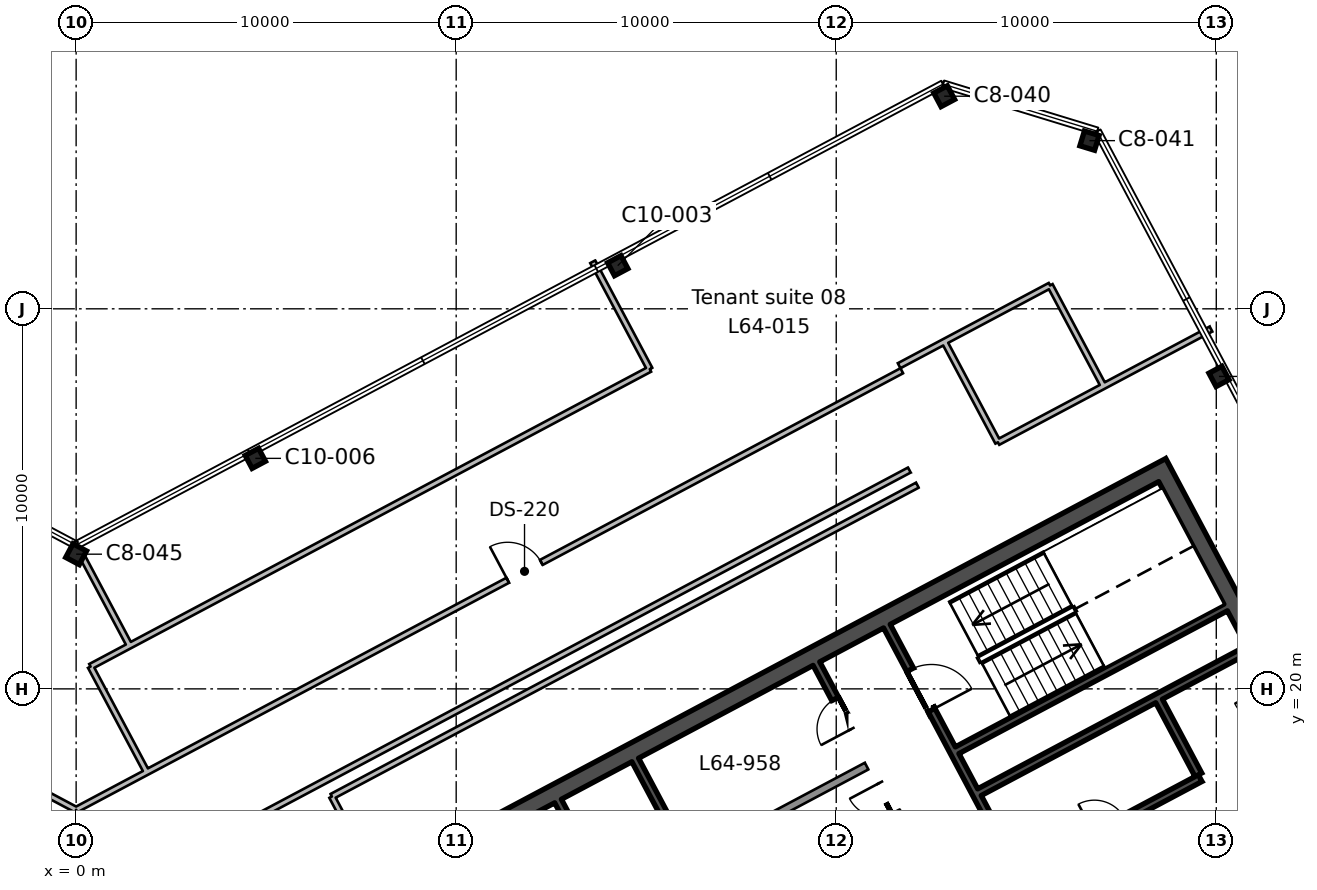
"""IFC4 building model, lengths in metres.
Left out: names, types, materials, properties, quantities, classifications, styles, units other than length and angle.
Written with IfcOpenShell. Run it as: python <this file> out.ifc"""

import sys

from ifc_helpers import new_model, si_unit, direction, frame, frame_2d, origin, origin_2d, place, context, subcontext, project, spatial, rectangle, i_section, extrude, element, fill, save


model = new_model("IFC4")
c1 = context("Model", 3, precision=1e-05, world=origin(), true_north=direction((0.0, 1.0)))
c2 = subcontext(c1, "Body", "Model", "MODEL_VIEW")
j1 = project(units=[si_unit("LENGTHUNIT", "METRE"), si_unit("PLANEANGLEUNIT", "RADIAN")], contexts=[c1])
p1 = place(None, origin())
s1 = spatial("IfcSite", under=j1, at=p1, CompositionType="ELEMENT")
p2 = place(p1, origin())
s2 = spatial("IfcBuilding", under=s1, at=p2, CompositionType="ELEMENT")
p3 = place(p2, frame((0.0, 0.0, 285.3)))
s3 = spatial("IfcBuildingStorey", under=s2, at=p3, CompositionType="ELEMENT", Elevation=285.3)
p4 = place(p3, frame((0.0, 23.544, 0.0), z_axis=(0.0, 0.0, 1.0), x_axis=(-0.882947592859, 0.469471562786, 0.0)))
e1 = element("IfcColumn", 1, at=p4, inside=s3, PredefinedType="COLUMN", context=c2, shape_type="SweptSolid", body=[
    extrude(i_section(OverallWidth=0.404, OverallDepth=0.406, WebThickness=0.027, FlangeThickness=0.044, FilletRadius=0.015, at=origin_2d()), origin(), (0.0, 0.0, 1.0), 3.9),
])
for number, where, z_axis, x_axis in (
    (2, (4.715, 26.065, 0.0), (0.0, 0.0, 1.0), (-0.883, -0.469, 0.0)),
    (3, (30.071, 28.221, 0.0), (0.0, 0.0, 1.0), (-0.469, 0.883, 0.0)),
    (4, (14.251, 31.135, 0.0), (0.0, 0.0, 1.0), (-0.883, -0.469, 0.0)),
):
    element("IfcColumn", number, at=place(p3, frame(where, z_axis=z_axis, x_axis=x_axis)), inside=s3, PredefinedType="COLUMN", context=c2, shape_type="SweptSolid", body=[
        extrude(i_section(OverallWidth=0.399, OverallDepth=0.386, WebThickness=0.021, FlangeThickness=0.033, FilletRadius=0.015, at=origin_2d()), origin(), (0.0, 0.0, 1.0), 3.9),
    ])
for number, where, z_axis, x_axis in (
    (5, (26.664, 34.425, 0.0), (0.0, 0.0, 1.0), (-0.956, 0.292, 0.0)),
    (6, (22.841, 35.594, 0.0), (0.0, 0.0, 1.0), (-0.883, -0.469, 0.0)),
):
    element("IfcColumn", number, at=place(p3, frame(where, z_axis=z_axis, x_axis=x_axis)), inside=s3, PredefinedType="COLUMN", context=c2, shape_type="SweptSolid", body=[
        extrude(i_section(OverallWidth=0.404, OverallDepth=0.406, WebThickness=0.027, FlangeThickness=0.044, FilletRadius=0.015, at=origin_2d()), origin(), (0.0, 0.0, 1.0), 3.9),
    ])
p5 = place(p3, frame((37.439, 9.091, 0.0), z_axis=(0.0, 0.0, 1.0), x_axis=(-0.469467968382, 0.882949504028, 0.0)))
e7 = element("IfcWall", 7, at=p5, inside=s3, PredefinedType="SHEAR", context=c2, shape_type="SweptSolid", body=[
    extrude(rectangle(XDim=19.1, YDim=0.45, at=frame_2d((9.55, 0.0))), origin(), (0.0, 0.0, 1.0), 3.9),
])
p6 = place(p5, frame((10.15, 0.0, 0.0)))
e8 = element("IfcOpeningElement", 8, at=p6, cuts=e7, PredefinedType="OPENING", context=c2, shape_type="SweptSolid", body=[
    extrude(rectangle(XDim=2.4, YDim=2.4, at=frame_2d((1.2, 1.2))), frame((0.0, 0.235, 0.0), z_axis=(0.0, -1.0, 0.0), x_axis=(1.0, 0.0, 0.0)), (0.0, 0.0, 1.0), 0.47),
])
p7 = place(p3, frame((10.544, 16.167, 0.0), z_axis=(0.0, 0.0, 1.0), x_axis=(0.882947755831, 0.46947125628, 0.0)))
e9 = element("IfcWall", 9, at=p7, inside=s3, PredefinedType="SHEAR", context=c2, shape_type="SweptSolid", body=[
    extrude(rectangle(XDim=20.2, YDim=0.45, at=frame_2d((10.1, 0.0))), origin(), (0.0, 0.0, 1.0), 3.9),
])
p8 = place(p3, frame((14.394, 13.826, 0.0), z_axis=(0.0, 0.0, 1.0), x_axis=(-0.469494272526, 0.882935517501, 0.0)))
e10 = element("IfcWall", 10, at=p8, inside=s3, PredefinedType="SHEAR", context=c2, shape_type="SweptSolid", body=[
    extrude(rectangle(XDim=3.65, YDim=0.2, at=frame_2d((1.825, 0.0))), origin(), (0.0, 0.0, 1.0), 3.9),
])
p9 = place(p3, frame((18.138, 11.683, 0.0), z_axis=(0.0, 0.0, 1.0), x_axis=(-0.469480409012, 0.88294288918, 0.0)))
e11 = element("IfcWall", 11, at=p9, inside=s3, PredefinedType="SHEAR", context=c2, shape_type="SweptSolid", body=[
    extrude(rectangle(XDim=7.3, YDim=0.2, at=frame_2d((3.65, 0.0))), origin(), (0.0, 0.0, 1.0), 3.9),
])
p10 = place(p3, frame((22.906, 14.218, 0.0), z_axis=(0.0, 0.0, 1.0), x_axis=(-0.469480409012, 0.88294288918, 0.0)))
e12 = element("IfcWall", 12, at=p10, inside=s3, PredefinedType="SHEAR", context=c2, shape_type="SweptSolid", body=[
    extrude(rectangle(XDim=7.3, YDim=0.2, at=frame_2d((3.65, 0.0))), origin(), (0.0, 0.0, 1.0), 3.9),
])
p11 = place(p10, frame((2.85, 0.0, 0.0)))
e13 = element("IfcOpeningElement", 13, at=p11, cuts=e12, PredefinedType="OPENING", context=c2, shape_type="SweptSolid", body=[
    extrude(rectangle(XDim=0.9, YDim=2.1, at=frame_2d((0.45, 1.05))), frame((0.0, 0.11, 0.0), z_axis=(0.0, -1.0, 0.0), x_axis=(1.0, 0.0, 0.0)), (0.0, 0.0, 1.0), 0.22),
])
p12 = place(p10, frame((5.35, 0.0, 0.0)))
e14 = element("IfcOpeningElement", 14, at=p12, cuts=e12, PredefinedType="OPENING", context=c2, shape_type="SweptSolid", body=[
    extrude(rectangle(XDim=0.9, YDim=2.1, at=frame_2d((0.45, 1.05))), frame((0.0, 0.11, 0.0), z_axis=(0.0, -1.0, 0.0), x_axis=(1.0, 0.0, 0.0)), (0.0, 0.0, 1.0), 0.22),
])
p13 = place(p3, frame((24.76, 15.204, 0.0), z_axis=(0.0, 0.0, 1.0), x_axis=(-0.469494272526, 0.882935517501, 0.0)))
e15 = element("IfcWall", 15, at=p13, inside=s3, PredefinedType="SHEAR", context=c2, shape_type="SweptSolid", body=[
    extrude(rectangle(XDim=7.3, YDim=0.2, at=frame_2d((3.65, 0.0))), origin(), (0.0, 0.0, 1.0), 3.9),
])
p14 = place(p13, frame((4.8, 0.0, 0.0)))
e16 = element("IfcOpeningElement", 16, at=p14, cuts=e15, PredefinedType="OPENING", context=c2, shape_type="SweptSolid", body=[
    extrude(rectangle(XDim=1.2, YDim=2.1, at=frame_2d((0.6, 1.05))), frame((0.0, 0.11, 0.0), z_axis=(0.0, -1.0, 0.0), x_axis=(1.0, 0.0, 0.0)), (0.0, 0.0, 1.0), 0.22),
])
p15 = place(p3, frame((29.528, 17.739, 0.0), z_axis=(0.0, 0.0, 1.0), x_axis=(-0.469401318492, 0.882984938828, 0.0)))
e17 = element("IfcWall", 17, at=p15, inside=s3, PredefinedType="SHEAR", context=c2, shape_type="SweptSolid", body=[
    extrude(rectangle(XDim=2.2, YDim=0.2, at=frame_2d((1.1, 0.0))), origin(), (0.0, 0.0, 1.0), 3.9),
])
p16 = place(p3, frame((24.807, 15.116, 0.0), z_axis=(0.0, 0.0, 1.0), x_axis=(0.882942972946, 0.469480251476, 0.0)))
e18 = element("IfcWall", 18, at=p16, inside=s3, PredefinedType="SHEAR", context=c2, shape_type="SweptSolid", body=[
    extrude(rectangle(XDim=5.4, YDim=0.2, at=frame_2d((2.7, 0.0))), origin(), (0.0, 0.0, 1.0), 3.9),
])
p17 = place(p16, frame((2.25, 0.0, 0.0)))
e19 = element("IfcOpeningElement", 19, at=p17, cuts=e18, PredefinedType="OPENING", context=c2, shape_type="SweptSolid", body=[
    extrude(rectangle(XDim=0.9, YDim=2.1, at=frame_2d((0.45, 1.05))), frame((0.0, 0.11, 0.0), z_axis=(0.0, -1.0, 0.0), x_axis=(1.0, 0.0, 0.0)), (0.0, 0.0, 1.0), 0.22),
])
p18 = place(p3, frame((23.769, 17.282, 0.0), z_axis=(0.0, 0.0, 1.0), x_axis=(0.882940221191, 0.469485426614, 0.0)))
e20 = element("IfcWall", 20, at=p18, inside=s3, PredefinedType="SHEAR", context=c2, shape_type="SweptSolid", body=[
    extrude(rectangle(XDim=8.0, YDim=0.2, at=frame_2d((4.0, 0.0))), origin(), (0.0, 0.0, 1.0), 3.9),
])
p19 = place(p3, frame((23.182, 18.385, 0.0), z_axis=(0.0, 0.0, 1.0), x_axis=(0.88295287151, 0.469461634952, 0.0)))
e21 = element("IfcWall", 21, at=p19, inside=s3, PredefinedType="SHEAR", context=c2, shape_type="SweptSolid", body=[
    extrude(rectangle(XDim=8.0, YDim=0.2, at=frame_2d((4.0, 0.0))), origin(), (0.0, 0.0, 1.0), 3.9),
])
p20 = place(p3, frame((16.208, 15.527, 0.0), z_axis=(0.0, 0.0, 1.0), x_axis=(0.882953967957, 0.469459572775, 0.0)))
e22 = element("IfcWall", 22, at=p20, inside=s3, PredefinedType="SOLIDWALL", context=c2, shape_type="SweptSolid", body=[
    extrude(rectangle(XDim=5.2, YDim=0.2, at=frame_2d((2.6, 0.0))), origin(), (0.0, 0.0, 1.0), 3.9),
])
p21 = place(p3, frame((-32.894, 31.59, 0.0), z_axis=(0.0, 0.0, 1.0), x_axis=(0.882948512555, -0.469469833085, 0.0)))
e23 = element("IfcWall", 23, at=p21, inside=s3, PredefinedType="PARTITIONING", context=c2, shape_type="SweptSolid", body=[
    extrude(rectangle(XDim=37.255, YDim=0.15, at=frame_2d((18.627, 0.0))), origin(), (0.0, 0.0, 1.0), 3.54),
])
p22 = place(p3, frame((0.0, 14.1, 0.0), z_axis=(0.0, 0.0, 1.0), x_axis=(0.882935523368, 0.469494261493, 0.0)))
e24 = element("IfcWall", 24, at=p22, inside=s3, PredefinedType="PARTITIONING", context=c2, shape_type="SweptSolid", body=[
    extrude(rectangle(XDim=24.831, YDim=0.15, at=frame_2d((12.416, 0.0))), origin(), (0.0, 0.0, 1.0), 3.54),
])
p23 = place(p3, frame((22.135, 25.36, 0.0), z_axis=(0.0, 0.0, 1.0), x_axis=(-0.882945198202, -0.469476066453, 0.0)))
e25 = element("IfcWall", 25, at=p23, inside=s3, PredefinedType="PARTITIONING", context=c2, shape_type="SweptSolid", body=[
    extrude(rectangle(XDim=17.449, YDim=0.15, at=frame_2d((8.725, 0.0))), origin(), (0.0, 0.0, 1.0), 3.54),
])
p24 = place(p3, frame((6.728, 17.168, 0.0), z_axis=(0.0, 0.0, 1.0), x_axis=(0.469325262013, -0.883025366813, 0.0)))
e26 = element("IfcWall", 26, at=p24, inside=s3, PredefinedType="PARTITIONING", context=c2, shape_type="SweptSolid", body=[
    extrude(rectangle(XDim=3.814, YDim=0.15, at=frame_2d((1.907, 0.0))), origin(), (0.0, 0.0, 1.0), 3.54),
])
p25 = place(p3, frame((-32.046, 33.858, 0.0), z_axis=(0.0, 0.0, 1.0), x_axis=(0.882950883098, -0.469465374694, 0.0)))
e27 = element("IfcWall", 27, at=p25, inside=s3, PredefinedType="PARTITIONING", context=c2, shape_type="SweptSolid", body=[
    extrude(rectangle(XDim=36.294, YDim=0.15, at=frame_2d((18.147, 0.0))), origin(), (0.0, 0.0, 1.0), 3.54),
])
p26 = place(p25, frame((17.65, 0.0, 0.0)))
e28 = element("IfcOpeningElement", 28, at=p26, cuts=e27, PredefinedType="OPENING", context=c2, shape_type="SweptSolid", body=[
    extrude(rectangle(XDim=1.0, YDim=2.1, at=frame_2d((0.5, 1.05))), frame((0.0, 0.085, 0.0), z_axis=(0.0, -1.0, 0.0), x_axis=(1.0, 0.0, 0.0)), (0.0, 0.0, 1.0), 0.17),
])
p27 = place(p25, frame((9.25, 0.0, 0.0)))
e29 = element("IfcOpeningElement", 29, at=p27, cuts=e27, PredefinedType="OPENING", context=c2, shape_type="SweptSolid", body=[
    extrude(rectangle(XDim=1.0, YDim=2.1, at=frame_2d((0.5, 1.05))), frame((0.0, 0.085, 0.0), z_axis=(0.0, -1.0, 0.0), x_axis=(1.0, 0.0, 0.0)), (0.0, 0.0, 1.0), 0.17),
])
p28 = place(p3, frame((0.0, 16.819, 0.0), z_axis=(0.0, 0.0, 1.0), x_axis=(0.882886662494, 0.4695861382, 0.0)))
e30 = element("IfcWall", 30, at=p28, inside=s3, PredefinedType="PARTITIONING", context=c2, shape_type="SweptSolid", body=[
    extrude(rectangle(XDim=2.112, YDim=0.15, at=frame_2d((1.056, 0.0))), origin(), (0.0, 0.0, 1.0), 3.54),
])
p29 = place(p3, frame((0.379, 20.587, 0.0), z_axis=(0.0, 0.0, 1.0), x_axis=(0.469549985402, -0.882905890347, 0.0)))
e31 = element("IfcWall", 31, at=p29, inside=s3, PredefinedType="PARTITIONING", context=c2, shape_type="SweptSolid", body=[
    extrude(rectangle(XDim=3.15, YDim=0.15, at=frame_2d((1.575, 0.0))), origin(), (0.0, 0.0, 1.0), 3.54),
])
p30 = place(p3, frame((0.178, 23.45, 0.0), z_axis=(0.0, 0.0, 1.0), x_axis=(0.469495603372, -0.882934809833, 0.0)))
e32 = element("IfcWall", 32, at=p30, inside=s3, PredefinedType="PARTITIONING", context=c2, shape_type="SweptSolid", body=[
    extrude(rectangle(XDim=2.622, YDim=0.15, at=frame_2d((1.311, 0.0))), origin(), (0.0, 0.0, 1.0), 3.54),
])
p31 = place(p3, frame((1.406, 21.134, 0.0), z_axis=(0.0, 0.0, 1.0), x_axis=(-0.882590930183, -0.470141733905, 0.0)))
e33 = element("IfcWall", 33, at=p31, inside=s3, PredefinedType="PARTITIONING", context=c2, shape_type="SweptSolid", body=[
    extrude(rectangle(XDim=1.164, YDim=0.15, at=frame_2d((0.582, 0.0))), origin(), (0.0, 0.0, 1.0), 3.54),
])
p32 = place(p3, frame((1.406, 21.134, 0.0), z_axis=(0.0, 0.0, 1.0), x_axis=(0.88296030725, 0.469447649713, 0.0)))
e34 = element("IfcWall", 34, at=p32, inside=s3, PredefinedType="PARTITIONING", context=c2, shape_type="SweptSolid", body=[
    extrude(rectangle(XDim=15.503, YDim=0.15, at=frame_2d((7.752, 0.0))), origin(), (0.0, 0.0, 1.0), 3.54),
])
p33 = place(p3, frame((15.095, 28.412, 0.0), z_axis=(0.0, 0.0, 1.0), x_axis=(-0.469320691295, 0.883027796121, 0.0)))
e35 = element("IfcWall", 35, at=p33, inside=s3, PredefinedType="PARTITIONING", context=c2, shape_type="SweptSolid", body=[
    extrude(rectangle(XDim=3.2, YDim=0.15, at=frame_2d((1.6, 0.0))), origin(), (0.0, 0.0, 1.0), 3.54),
])
p34 = place(p3, frame((1.865, 17.811, 0.0), z_axis=(0.0, 0.0, 1.0), x_axis=(0.882960942519, 0.469446454866, 0.0)))
e36 = element("IfcWall", 36, at=p34, inside=s3, PredefinedType="PARTITIONING", context=c2, shape_type="SweptSolid", body=[
    extrude(rectangle(XDim=22.493, YDim=0.15, at=frame_2d((11.246, 0.0))), origin(), (0.0, 0.0, 1.0), 3.54),
])
p35 = place(p34, frame((10.75, 0.0, 0.0)))
e37 = element("IfcOpeningElement", 37, at=p35, cuts=e36, PredefinedType="OPENING", context=c2, shape_type="SweptSolid", body=[
    extrude(rectangle(XDim=1.0, YDim=2.1, at=frame_2d((0.5, 1.05))), frame((0.0, 0.085, 0.0), z_axis=(0.0, -1.0, 0.0), x_axis=(1.0, 0.0, 0.0)), (0.0, 0.0, 1.0), 0.17),
])
p36 = place(p3, frame((22.857, 29.114, 0.0), z_axis=(0.0, 0.0, 1.0), x_axis=(0.469523155086, -0.882920158813, 0.0)))
e38 = element("IfcWall", 38, at=p36, inside=s3, PredefinedType="PARTITIONING", context=c2, shape_type="SweptSolid", body=[
    extrude(rectangle(XDim=2.975, YDim=0.15, at=frame_2d((1.488, 0.0))), origin(), (0.0, 0.0, 1.0), 3.54),
])
p37 = place(p3, frame((24.254, 26.487, 0.0), z_axis=(0.0, 0.0, 1.0), x_axis=(0.882975806835, 0.469418496167, 0.0)))
e39 = element("IfcWall", 39, at=p37, inside=s3, PredefinedType="PARTITIONING", context=c2, shape_type="SweptSolid", body=[
    extrude(rectangle(XDim=6.35, YDim=0.15, at=frame_2d((3.175, 0.0))), origin(), (0.0, 0.0, 1.0), 3.54),
])
p38 = place(p3, frame((27.035, 27.966, 0.0), z_axis=(0.0, 0.0, 1.0), x_axis=(-0.469341661158, 0.883016650523, 0.0)))
e40 = element("IfcWall", 40, at=p38, inside=s3, PredefinedType="PARTITIONING", context=c2, shape_type="SweptSolid", body=[
    extrude(rectangle(XDim=3.0, YDim=0.15, at=frame_2d((1.5, 0.0))), origin(), (0.0, 0.0, 1.0), 3.54),
])
p39 = place(p3, frame((25.627, 30.615, 0.0), z_axis=(0.0, 0.0, 1.0), x_axis=(-0.882933661484, -0.469497762954, 0.0)))
e41 = element("IfcWall", 41, at=p39, inside=s3, PredefinedType="PARTITIONING", context=c2, shape_type="SweptSolid", body=[
    extrude(rectangle(XDim=4.499, YDim=0.15, at=frame_2d((2.249, 0.0))), origin(), (0.0, 0.0, 1.0), 3.54),
])
p40 = place(p14, frame((1.2, 0.0, 0.0), z_axis=(0.0, 0.0, 1.0), x_axis=(-1.0, 0.0, 0.0)))
e42 = element("IfcDoor", 42, at=p40, inside=s3, OperationType="SINGLE_SWING_RIGHT", PredefinedType="DOOR", context=c2, shape_type="SweptSolid", body=[
    extrude(rectangle(XDim=1.2, YDim=2.1, at=frame_2d((0.6, 1.05))), frame((0.0, 0.025, 0.0), z_axis=(0.0, -1.0, 0.0), x_axis=(1.0, 0.0, 0.0)), (0.0, 0.0, 1.0), 0.05),
])
fill(e16, e42)
p41 = place(p11, origin())
e43 = element("IfcDoor", 43, at=p41, inside=s3, OperationType="SINGLE_SWING_RIGHT", PredefinedType="DOOR", context=c2, shape_type="SweptSolid", body=[
    extrude(rectangle(XDim=0.9, YDim=2.1, at=frame_2d((0.45, 1.05))), frame((0.0, 0.025, 0.0), z_axis=(0.0, -1.0, 0.0), x_axis=(1.0, 0.0, 0.0)), (0.0, 0.0, 1.0), 0.05),
])
fill(e13, e43)
p42 = place(p12, origin())
e44 = element("IfcDoor", 44, at=p42, inside=s3, OperationType="SINGLE_SWING_LEFT", PredefinedType="DOOR", context=c2, shape_type="SweptSolid", body=[
    extrude(rectangle(XDim=0.9, YDim=2.1, at=frame_2d((0.45, 1.05))), frame((0.0, 0.025, 0.0), z_axis=(0.0, -1.0, 0.0), x_axis=(1.0, 0.0, 0.0)), (0.0, 0.0, 1.0), 0.05),
])
fill(e14, e44)
p43 = place(p35, origin())
e45 = element("IfcDoor", 45, at=p43, inside=s3, OperationType="SINGLE_SWING_LEFT", PredefinedType="DOOR", context=c2, shape_type="SweptSolid", body=[
    extrude(rectangle(XDim=1.0, YDim=2.1, at=frame_2d((0.5, 1.05))), frame((0.0, 0.025, 0.0), z_axis=(0.0, -1.0, 0.0), x_axis=(1.0, 0.0, 0.0)), (0.0, 0.0, 1.0), 0.05),
])
fill(e37, e45)
save(model, sys.argv[1])
